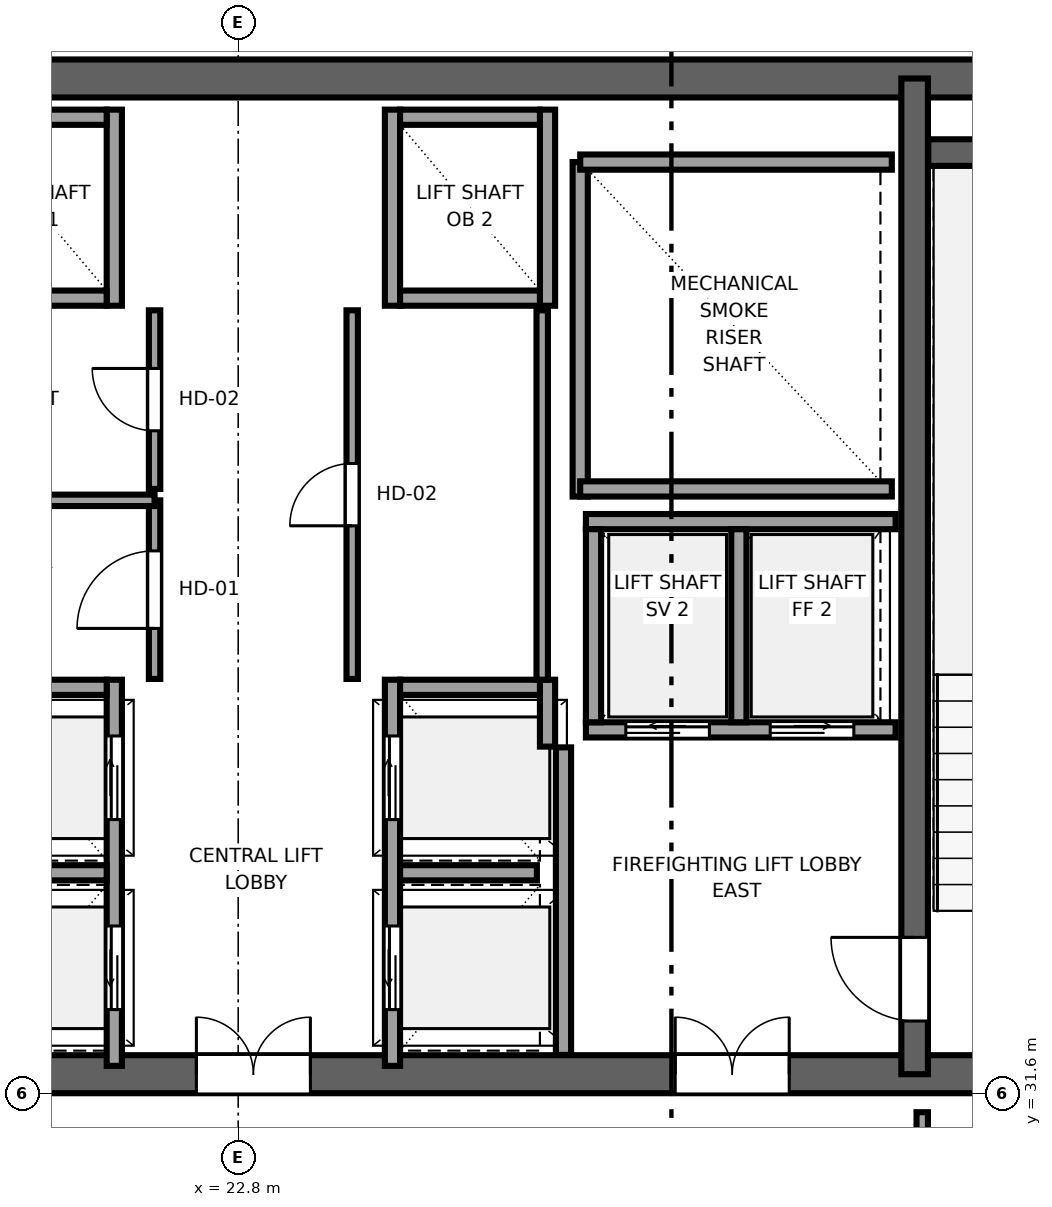
"""IFC4 building model, lengths in metres.
Left out: names, types, materials, properties, quantities, classifications, styles, units other than length and angle.
Written with IfcOpenShell. Run it as: python <this file> out.ifc"""

import sys

from ifc_helpers import new_model, si_unit, direction, frame, frame_2d, origin, place, context, subcontext, project, spatial, rectangle, extrude, source, transform, mapped, element, fill, save


model = new_model("IFC4")
c1 = context("Model", 3, precision=1e-05, world=origin(), true_north=direction((0.0, 1.0)))
c2 = subcontext(c1, "Body", "Model", "MODEL_VIEW")
j1 = project(units=[si_unit("LENGTHUNIT", "METRE"), si_unit("PLANEANGLEUNIT", "RADIAN")], contexts=[c1])
p1 = place(None, origin())
s1 = spatial("IfcSite", under=j1, at=p1, CompositionType="ELEMENT")
p2 = place(p1, origin())
s2 = spatial("IfcBuilding", under=s1, at=p2, CompositionType="ELEMENT")
p3 = place(p2, frame((0.0, 0.0, 278.6)))
s3 = spatial("IfcBuildingStorey", under=s2, at=p3, CompositionType="ELEMENT", Elevation=278.6)
p4 = place(p3, frame((10.0, 31.85, 0.0), z_axis=(0.0, 0.0, 1.0), x_axis=(1.0, 0.0, 0.0)))
e1 = element("IfcWall", 1, at=p4, inside=s3, PredefinedType="SHEAR", context=c2, shape_type="SweptSolid", body=[
    extrude(rectangle(XDim=26.0, YDim=0.5, at=frame_2d((13.0, 0.0))), origin(), (0.0, 0.0, 1.0), 3.55),
])
p5 = place(p4, frame((7.45, 0.0, 0.0), z_axis=(0.0, 0.0, 1.0), x_axis=(-1.0, 0.0, 0.0)))
e2 = element("IfcOpeningElement", 2, at=p5, cuts=e1, PredefinedType="OPENING", context=c2, shape_type="SweptSolid", body=[
    extrude(rectangle(XDim=1.5, YDim=2.04, at=frame_2d((0.75, 1.02))), frame((0.0, 0.26, 0.0), z_axis=(0.0, -1.0, 0.0), x_axis=(1.0, 0.0, 0.0)), (0.0, 0.0, 1.0), 0.52),
])
p6 = place(p4, frame((13.75, 0.0, 0.0), z_axis=(0.0, 0.0, 1.0), x_axis=(-1.0, 0.0, 0.0)))
e3 = element("IfcOpeningElement", 3, at=p6, cuts=e1, PredefinedType="OPENING", context=c2, shape_type="SweptSolid", body=[
    extrude(rectangle(XDim=1.5, YDim=2.04, at=frame_2d((0.75, 1.02))), frame((0.0, 0.26, 0.0), z_axis=(0.0, -1.0, 0.0), x_axis=(1.0, 0.0, 0.0)), (0.0, 0.0, 1.0), 0.52),
])
p7 = place(p4, frame((20.05, 0.0, 0.0), z_axis=(0.0, 0.0, 1.0), x_axis=(-1.0, 0.0, 0.0)))
e4 = element("IfcOpeningElement", 4, at=p7, cuts=e1, PredefinedType="OPENING", context=c2, shape_type="SweptSolid", body=[
    extrude(rectangle(XDim=1.5, YDim=2.04, at=frame_2d((0.75, 1.02))), frame((0.0, 0.26, 0.0), z_axis=(0.0, -1.0, 0.0), x_axis=(1.0, 0.0, 0.0)), (0.0, 0.0, 1.0), 0.52),
])
p8 = place(p3, frame((10.0, 44.95, 0.0), z_axis=(0.0, 0.0, 1.0), x_axis=(1.0, 0.0, 0.0)))
e5 = element("IfcWall", 5, at=p8, inside=s3, PredefinedType="SHEAR", context=c2, shape_type="SweptSolid", body=[
    extrude(rectangle(XDim=26.0, YDim=0.5, at=frame_2d((13.0, 0.0))), origin(), (0.0, 0.0, 1.0), 3.55),
])
p9 = place(p3, frame((31.7, 31.85, 0.0), z_axis=(0.0, 0.0, 1.0), x_axis=(0.0, 1.0, 0.0)))
e6 = element("IfcWall", 6, at=p9, inside=s3, PredefinedType="SHEAR", context=c2, shape_type="SweptSolid", body=[
    extrude(rectangle(XDim=13.1, YDim=0.35, at=frame_2d((6.55, 0.0))), origin(), (0.0, 0.0, 1.0), 3.55),
])
p10 = place(p9, frame((1.8, 0.0, 0.0), z_axis=(0.0, 0.0, 1.0), x_axis=(-1.0, 0.0, 0.0)))
e7 = element("IfcOpeningElement", 7, at=p10, cuts=e6, PredefinedType="OPENING", context=c2, shape_type="SweptSolid", body=[
    extrude(rectangle(XDim=1.1, YDim=2.12, at=frame_2d((0.55, 1.06))), frame((0.0, 0.185, 0.0), z_axis=(0.0, -1.0, 0.0), x_axis=(1.0, 0.0, 0.0)), (0.0, 0.0, 1.0), 0.37),
])
p11 = place(p3, frame((31.88, 43.975, 0.0), z_axis=(0.0, 0.0, 1.0), x_axis=(1.0, 0.0, 0.0)))
e8 = element("IfcWall", 8, at=p11, inside=s3, PredefinedType="SHEAR", context=c2, shape_type="SweptSolid", body=[
    extrude(rectangle(XDim=3.6, YDim=0.35, at=frame_2d((1.8, 0.0))), origin(), (0.0, 0.0, 1.0), 3.55),
])
p12 = place(p3, frame((27.3, 39.45, 0.0), z_axis=(0.0, 0.0, 1.0), x_axis=(0.0, 1.0, 0.0)))
e9 = element("IfcWall", 9, at=p12, inside=s3, PredefinedType="SOLIDWALL", context=c2, shape_type="SweptSolid", body=[
    extrude(rectangle(XDim=4.4, YDim=0.2, at=frame_2d((2.2, 0.0))), origin(), (0.0, 0.0, 1.0), 3.33),
])
for number, where, z_axis, x_axis in (
    (10, (27.3, 39.55, 0.0), (0.0, 0.0, 1.0), (1.0, 0.0, 0.0)),
    (11, (27.3, 43.85, 0.0), (0.0, 0.0, 1.0), (1.0, 0.0, 0.0)),
):
    element("IfcWall", number, at=place(p3, frame(where, z_axis=z_axis, x_axis=x_axis)), inside=s3, PredefinedType="SOLIDWALL", context=c2, shape_type="SweptSolid", body=[
        extrude(rectangle(XDim=4.1, YDim=0.2, at=frame_2d((2.05, 0.0))), origin(), (0.0, 0.0, 1.0), 3.33),
    ])
p13 = place(p3, frame((27.08, 32.104, 0.0), z_axis=(0.0, 0.0, 1.0), x_axis=(0.0, 1.0, 0.0)))
e12 = element("IfcWall", 12, at=p13, inside=s3, PredefinedType="SOLIDWALL", context=c2, shape_type="SweptSolid", body=[
    extrude(rectangle(XDim=4.046, YDim=0.2, at=frame_2d((2.023, 0.0))), origin(), (0.0, 0.0, 1.0), 3.33),
])
p14 = place(p3, frame((21.17, 31.96, 0.0), z_axis=(0.0, 0.0, 1.0), x_axis=(0.0, 1.0, 0.0)))
e13 = element("IfcWall", 13, at=p14, inside=s3, PredefinedType="SOLIDWALL", context=c2, shape_type="SweptSolid", body=[
    extrude(rectangle(XDim=5.08, YDim=0.2, at=frame_2d((2.54, 0.0))), origin(), (0.0, 0.0, 1.0), 3.33),
])
p15 = place(p14, frame((0.74, 0.0, 0.0)))
e14 = element("IfcOpeningElement", 14, at=p15, cuts=e13, PredefinedType="OPENING", context=c2, shape_type="SweptSolid", body=[
    extrude(rectangle(XDim=1.1, YDim=2.12, at=frame_2d((0.55, 1.06))), frame((0.0, 0.11, 0.0), z_axis=(0.0, -1.0, 0.0), x_axis=(1.0, 0.0, 0.0)), (0.0, 0.0, 1.0), 0.22),
])
p16 = place(p14, frame((3.24, 0.0, 0.0)))
e15 = element("IfcOpeningElement", 15, at=p16, cuts=e13, PredefinedType="OPENING", context=c2, shape_type="SweptSolid", body=[
    extrude(rectangle(XDim=1.1, YDim=2.12, at=frame_2d((0.55, 1.06))), frame((0.0, 0.11, 0.0), z_axis=(0.0, -1.0, 0.0), x_axis=(1.0, 0.0, 0.0)), (0.0, 0.0, 1.0), 0.22),
])
p17 = place(p3, frame((19.23, 36.94, 0.0), z_axis=(0.0, 0.0, 1.0), x_axis=(1.0, 0.0, 0.0)))
e16 = element("IfcWall", 16, at=p17, inside=s3, PredefinedType="SOLIDWALL", context=c2, shape_type="SweptSolid", body=[
    extrude(rectangle(XDim=1.84, YDim=0.2, at=frame_2d((0.92, 0.0))), origin(), (0.0, 0.0, 1.0), 3.33),
])
p18 = place(p3, frame((19.27, 34.5, 0.0), z_axis=(0.0, 0.0, 1.0), x_axis=(1.0, 0.0, 0.0)))
e17 = element("IfcWall", 17, at=p18, inside=s3, PredefinedType="SOLIDWALL", context=c2, shape_type="SweptSolid", body=[
    extrude(rectangle(XDim=1.8, YDim=0.2, at=frame_2d((0.9, 0.0))), origin(), (0.0, 0.0, 1.0), 3.33),
])
p19 = place(p3, frame((21.17, 41.96, 0.0), z_axis=(0.0, 0.0, 1.0), x_axis=(0.0, 1.0, 0.0)))
e18 = element("IfcWall", 18, at=p19, inside=s3, PredefinedType="SOLIDWALL", context=c2, shape_type="SweptSolid", body=[
    extrude(rectangle(XDim=2.58, YDim=0.2, at=frame_2d((1.29, 0.0))), origin(), (0.0, 0.0, 1.0), 3.33),
])
for number, where, z_axis, x_axis in (
    (19, (19.23, 42.06, 0.0), (0.0, 0.0, 1.0), (1.0, 0.0, 0.0)),
    (20, (19.23, 44.44, 0.0), (0.0, 0.0, 1.0), (1.0, 0.0, 0.0)),
):
    element("IfcWall", number, at=place(p3, frame(where, z_axis=z_axis, x_axis=x_axis)), inside=s3, PredefinedType="SOLIDWALL", context=c2, shape_type="SweptSolid", body=[
        extrude(rectangle(XDim=1.84, YDim=0.2, at=frame_2d((0.92, 0.0))), origin(), (0.0, 0.0, 1.0), 3.33),
    ])
p20 = place(p3, frame((27.375, 36.38, 0.0), z_axis=(0.0, 0.0, 1.0), x_axis=(1.0, 0.0, 0.0)))
e21 = element("IfcWall", 21, at=p20, inside=s3, PredefinedType="SOLIDWALL", context=c2, shape_type="SweptSolid", body=[
    extrude(rectangle(XDim=4.075, YDim=0.2, at=frame_2d((2.038, 0.0))), origin(), (0.0, 0.0, 1.0), 3.33),
])
p21 = place(p20, frame((0.525, 0.0, 0.0)))
e22 = element("IfcOpeningElement", 22, at=p21, cuts=e21, PredefinedType="OPENING", context=c2, shape_type="SweptSolid", body=[
    extrude(rectangle(XDim=1.1, YDim=2.12, at=frame_2d((0.55, 1.06))), frame((0.0, 0.11, 0.0), z_axis=(0.0, -1.0, 0.0), x_axis=(1.0, 0.0, 0.0)), (0.0, 0.0, 1.0), 0.22),
])
p22 = place(p20, frame((2.425, 0.0, 0.0)))
e23 = element("IfcOpeningElement", 23, at=p22, cuts=e21, PredefinedType="OPENING", context=c2, shape_type="SweptSolid", body=[
    extrude(rectangle(XDim=1.1, YDim=2.12, at=frame_2d((0.55, 1.06))), frame((0.0, 0.11, 0.0), z_axis=(0.0, -1.0, 0.0), x_axis=(1.0, 0.0, 0.0)), (0.0, 0.0, 1.0), 0.22),
])
p23 = place(p3, frame((27.375, 39.12, 0.0), z_axis=(0.0, 0.0, 1.0), x_axis=(1.0, 0.0, 0.0)))
e24 = element("IfcWall", 24, at=p23, inside=s3, PredefinedType="SOLIDWALL", context=c2, shape_type="SweptSolid", body=[
    extrude(rectangle(XDim=4.075, YDim=0.2, at=frame_2d((2.038, 0.0))), origin(), (0.0, 0.0, 1.0), 3.33),
])
for number, where, z_axis, x_axis in (
    (25, (27.475, 36.48, 0.0), (0.0, 0.0, 1.0), (0.0, 1.0, 0.0)),
    (26, (29.387, 36.48, 0.0), (0.0, 0.0, 1.0), (0.0, 1.0, 0.0)),
):
    element("IfcWall", number, at=place(p3, frame(where, z_axis=z_axis, x_axis=x_axis)), inside=s3, PredefinedType="SOLIDWALL", context=c2, shape_type="SweptSolid", body=[
        extrude(rectangle(XDim=2.54, YDim=0.2, at=frame_2d((1.27, 0.0))), origin(), (0.0, 0.0, 1.0), 3.33),
    ])
p24 = place(p3, frame((24.83, 31.96, 0.0), z_axis=(0.0, 0.0, 1.0), x_axis=(0.0, 1.0, 0.0)))
e27 = element("IfcWall", 27, at=p24, inside=s3, PredefinedType="SOLIDWALL", context=c2, shape_type="SweptSolid", body=[
    extrude(rectangle(XDim=5.08, YDim=0.2, at=frame_2d((2.54, 0.0))), origin(), (0.0, 0.0, 1.0), 3.33),
])
p25 = place(p24, frame((0.74, 0.0, 0.0)))
e28 = element("IfcOpeningElement", 28, at=p25, cuts=e27, PredefinedType="OPENING", context=c2, shape_type="SweptSolid", body=[
    extrude(rectangle(XDim=1.1, YDim=2.12, at=frame_2d((0.55, 1.06))), frame((0.0, 0.11, 0.0), z_axis=(0.0, -1.0, 0.0), x_axis=(1.0, 0.0, 0.0)), (0.0, 0.0, 1.0), 0.22),
])
p26 = place(p24, frame((3.24, 0.0, 0.0)))
e29 = element("IfcOpeningElement", 29, at=p26, cuts=e27, PredefinedType="OPENING", context=c2, shape_type="SweptSolid", body=[
    extrude(rectangle(XDim=1.1, YDim=2.12, at=frame_2d((0.55, 1.06))), frame((0.0, 0.11, 0.0), z_axis=(0.0, -1.0, 0.0), x_axis=(1.0, 0.0, 0.0)), (0.0, 0.0, 1.0), 0.22),
])
p27 = place(p3, frame((26.87, 36.16, 0.0), z_axis=(0.0, 0.0, 1.0), x_axis=(0.0, 1.0, 0.0)))
e30 = element("IfcWall", 30, at=p27, inside=s3, PredefinedType="SOLIDWALL", context=c2, shape_type="SweptSolid", body=[
    extrude(rectangle(XDim=0.88, YDim=0.2, at=frame_2d((0.44, 0.0))), origin(), (0.0, 0.0, 1.0), 3.33),
])
p28 = place(p3, frame((24.93, 36.94, 0.0), z_axis=(0.0, 0.0, 1.0), x_axis=(1.0, 0.0, 0.0)))
e31 = element("IfcWall", 31, at=p28, inside=s3, PredefinedType="SOLIDWALL", context=c2, shape_type="SweptSolid", body=[
    extrude(rectangle(XDim=1.84, YDim=0.2, at=frame_2d((0.92, 0.0))), origin(), (0.0, 0.0, 1.0), 3.33),
])
p29 = place(p3, frame((24.93, 34.5, 0.0), z_axis=(0.0, 0.0, 1.0), x_axis=(1.0, 0.0, 0.0)))
e32 = element("IfcWall", 32, at=p29, inside=s3, PredefinedType="SOLIDWALL", context=c2, shape_type="SweptSolid", body=[
    extrude(rectangle(XDim=1.8, YDim=0.2, at=frame_2d((0.9, 0.0))), origin(), (0.0, 0.0, 1.0), 3.33),
])
for number, where, z_axis, x_axis in (
    (33, (24.83, 41.96, 0.0), (0.0, 0.0, 1.0), (0.0, 1.0, 0.0)),
    (34, (26.87, 41.96, 0.0), (0.0, 0.0, 1.0), (0.0, 1.0, 0.0)),
):
    element("IfcWall", number, at=place(p3, frame(where, z_axis=z_axis, x_axis=x_axis)), inside=s3, PredefinedType="SOLIDWALL", context=c2, shape_type="SweptSolid", body=[
        extrude(rectangle(XDim=2.58, YDim=0.2, at=frame_2d((1.29, 0.0))), origin(), (0.0, 0.0, 1.0), 3.33),
    ])
for number, where, z_axis, x_axis in (
    (35, (24.93, 42.06, 0.0), (0.0, 0.0, 1.0), (1.0, 0.0, 0.0)),
    (36, (24.93, 44.44, 0.0), (0.0, 0.0, 1.0), (1.0, 0.0, 0.0)),
):
    element("IfcWall", number, at=place(p3, frame(where, z_axis=z_axis, x_axis=x_axis)), inside=s3, PredefinedType="SOLIDWALL", context=c2, shape_type="SweptSolid", body=[
        extrude(rectangle(XDim=1.84, YDim=0.2, at=frame_2d((0.92, 0.0))), origin(), (0.0, 0.0, 1.0), 3.33),
    ])
p30 = place(p3, frame((21.7, 37.05, 0.0), z_axis=(0.0, 0.0, 1.0), x_axis=(0.0, 1.0, 0.0)))
e37 = element("IfcWall", 37, at=p30, inside=s3, PredefinedType="PARTITIONING", context=c2, shape_type="SweptSolid", body=[
    extrude(rectangle(XDim=2.35, YDim=0.15, at=frame_2d((1.175, 0.0))), origin(), (0.0, 0.0, 1.0), 3.33),
])
p31 = place(p30, frame((0.665, 0.0, 0.0)))
e38 = element("IfcOpeningElement", 38, at=p31, cuts=e37, PredefinedType="OPENING", context=c2, shape_type="SweptSolid", body=[
    extrude(rectangle(XDim=1.02, YDim=2.03, at=frame_2d((0.51, 1.015))), frame((0.0, 0.085, 0.0), z_axis=(0.0, -1.0, 0.0), x_axis=(1.0, 0.0, 0.0)), (0.0, 0.0, 1.0), 0.17),
])
p32 = place(p3, frame((19.2, 39.4, 0.0), z_axis=(0.0, 0.0, 1.0), x_axis=(1.0, 0.0, 0.0)))
e39 = element("IfcWall", 39, at=p32, inside=s3, PredefinedType="PARTITIONING", context=c2, shape_type="SweptSolid", body=[
    extrude(rectangle(XDim=2.5, YDim=0.15, at=frame_2d((1.25, 0.0))), origin(), (0.0, 0.0, 1.0), 3.33),
])
p33 = place(p3, frame((21.7, 39.55, 0.0), z_axis=(0.0, 0.0, 1.0), x_axis=(0.0, 1.0, 0.0)))
e40 = element("IfcWall", 40, at=p33, inside=s3, PredefinedType="PARTITIONING", context=c2, shape_type="SweptSolid", body=[
    extrude(rectangle(XDim=2.35, YDim=0.15, at=frame_2d((1.175, 0.0))), origin(), (0.0, 0.0, 1.0), 3.33),
])
p34 = place(p33, frame((0.765, 0.0, 0.0)))
e41 = element("IfcOpeningElement", 41, at=p34, cuts=e40, PredefinedType="OPENING", context=c2, shape_type="SweptSolid", body=[
    extrude(rectangle(XDim=0.82, YDim=2.01, at=frame_2d((0.41, 1.005))), frame((0.0, 0.085, 0.0), z_axis=(0.0, -1.0, 0.0), x_axis=(1.0, 0.0, 0.0)), (0.0, 0.0, 1.0), 0.17),
])
p35 = place(p3, frame((24.3, 37.05, 0.0), z_axis=(0.0, 0.0, 1.0), x_axis=(0.0, 1.0, 0.0)))
e42 = element("IfcWall", 42, at=p35, inside=s3, PredefinedType="PARTITIONING", context=c2, shape_type="SweptSolid", body=[
    extrude(rectangle(XDim=4.85, YDim=0.15, at=frame_2d((2.425, 0.0))), origin(), (0.0, 0.0, 1.0), 3.33),
])
p36 = place(p35, frame((2.015, 0.0, 0.0)))
e43 = element("IfcOpeningElement", 43, at=p36, cuts=e42, PredefinedType="OPENING", context=c2, shape_type="SweptSolid", body=[
    extrude(rectangle(XDim=0.82, YDim=2.01, at=frame_2d((0.41, 1.005))), frame((0.0, 0.085, 0.0), z_axis=(0.0, -1.0, 0.0), x_axis=(1.0, 0.0, 0.0)), (0.0, 0.0, 1.0), 0.17),
])
p37 = place(p3, frame((26.8, 37.04, 0.0), z_axis=(0.0, 0.0, 1.0), x_axis=(0.0, 1.0, 0.0)))
e44 = element("IfcWall", 44, at=p37, inside=s3, PredefinedType="PARTITIONING", context=c2, shape_type="SweptSolid", body=[
    extrude(rectangle(XDim=4.86, YDim=0.15, at=frame_2d((2.43, 0.0))), origin(), (0.0, 0.0, 1.0), 3.33),
])
p38 = place(p3, frame((31.8, 24.8, 0.0), z_axis=(0.0, 0.0, 1.0), x_axis=(0.0, 1.0, 0.0)))
e45 = element("IfcWall", 45, at=p38, inside=s3, PredefinedType="PARTITIONING", context=c2, shape_type="SweptSolid", body=[
    extrude(rectangle(XDim=6.55, YDim=0.15, at=frame_2d((3.275, 0.0))), origin(), (0.0, 0.0, 1.0), 3.33),
])
p39 = place(p38, frame((2.765, 0.0, 0.0)))
e46 = element("IfcOpeningElement", 46, at=p39, cuts=e45, PredefinedType="OPENING", context=c2, shape_type="SweptSolid", body=[
    extrude(rectangle(XDim=1.02, YDim=2.03, at=frame_2d((0.51, 1.015))), frame((0.0, 0.085, 0.0), z_axis=(0.0, -1.0, 0.0), x_axis=(1.0, 0.0, 0.0)), (0.0, 0.0, 1.0), 0.17),
])
m1 = source(origin(), c2, "Body", "SweptSolid", [
    extrude(rectangle(XDim=1.1, YDim=2.12, at=frame_2d((0.55, 1.06))), frame((0.0, 0.025, 0.0), z_axis=(0.0, -1.0, 0.0), x_axis=(1.0, 0.0, 0.0)), (0.0, 0.0, 1.0), 0.05),
])
p40 = place(p10, origin())
e47 = element("IfcDoor", 47, at=p40, inside=s3, OperationType="SINGLE_SWING_RIGHT", PredefinedType="DOOR", context=c2, shape_type="MappedRepresentation", body=[
    mapped(m1, transform((0.0, 0.0, 0.0), x_axis=(1.0, 0.0, 0.0), y_axis=(0.0, 1.0, 0.0), z_axis=(0.0, 0.0, 1.0), scale=1.0)),
])
fill(e7, e47)
m2 = source(origin(), c2, "Body", "SweptSolid", [
    extrude(rectangle(XDim=1.5, YDim=2.04, at=frame_2d((0.75, 1.02))), frame((0.0, 0.025, 0.0), z_axis=(0.0, -1.0, 0.0), x_axis=(1.0, 0.0, 0.0)), (0.0, 0.0, 1.0), 0.05),
])
p41 = place(p6, origin())
e48 = element("IfcDoor", 48, at=p41, inside=s3, OperationType="DOUBLE_DOOR_SINGLE_SWING", PredefinedType="DOOR", context=c2, shape_type="MappedRepresentation", body=[
    mapped(m2, transform((0.0, 0.0, 0.0), x_axis=(1.0, 0.0, 0.0), y_axis=(0.0, 1.0, 0.0), z_axis=(0.0, 0.0, 1.0), scale=1.0)),
])
fill(e3, e48)
p42 = place(p7, origin())
e49 = element("IfcDoor", 49, at=p42, inside=s3, OperationType="DOUBLE_DOOR_SINGLE_SWING", PredefinedType="DOOR", context=c2, shape_type="MappedRepresentation", body=[
    mapped(m2, transform((0.0, 0.0, 0.0), x_axis=(1.0, 0.0, 0.0), y_axis=(0.0, 1.0, 0.0), z_axis=(0.0, 0.0, 1.0), scale=1.0)),
])
fill(e4, e49)
m3 = source(origin(), c2, "Body", "SweptSolid", [
    extrude(rectangle(XDim=1.1, YDim=2.12, at=frame_2d((0.55, 1.06))), frame((0.0, 0.025, 0.0), z_axis=(0.0, -1.0, 0.0), x_axis=(1.0, 0.0, 0.0)), (0.0, 0.0, 1.0), 0.05),
])
p43 = place(p15, origin())
e50 = element("IfcDoor", 50, at=p43, inside=s3, OperationType="SLIDING_TO_LEFT", PredefinedType="DOOR", context=c2, shape_type="MappedRepresentation", body=[
    mapped(m3, transform((0.0, 0.0, 0.0), x_axis=(1.0, 0.0, 0.0), y_axis=(0.0, 1.0, 0.0), z_axis=(0.0, 0.0, 1.0), scale=1.0)),
])
fill(e14, e50)
p44 = place(p16, origin())
e51 = element("IfcDoor", 51, at=p44, inside=s3, OperationType="SLIDING_TO_RIGHT", PredefinedType="DOOR", context=c2, shape_type="MappedRepresentation", body=[
    mapped(m3, transform((0.0, 0.0, 0.0), x_axis=(1.0, 0.0, 0.0), y_axis=(0.0, 1.0, 0.0), z_axis=(0.0, 0.0, 1.0), scale=1.0)),
])
fill(e15, e51)
p45 = place(p21, origin())
e52 = element("IfcDoor", 52, at=p45, inside=s3, OperationType="SLIDING_TO_LEFT", PredefinedType="DOOR", context=c2, shape_type="MappedRepresentation", body=[
    mapped(m3, transform((0.0, 0.0, 0.0), x_axis=(1.0, 0.0, 0.0), y_axis=(0.0, 1.0, 0.0), z_axis=(0.0, 0.0, 1.0), scale=1.0)),
])
fill(e22, e52)
p46 = place(p22, origin())
e53 = element("IfcDoor", 53, at=p46, inside=s3, OperationType="SLIDING_TO_RIGHT", PredefinedType="DOOR", context=c2, shape_type="MappedRepresentation", body=[
    mapped(m3, transform((0.0, 0.0, 0.0), x_axis=(1.0, 0.0, 0.0), y_axis=(0.0, 1.0, 0.0), z_axis=(0.0, 0.0, 1.0), scale=1.0)),
])
fill(e23, e53)
p47 = place(p25, origin())
e54 = element("IfcDoor", 54, at=p47, inside=s3, OperationType="SLIDING_TO_LEFT", PredefinedType="DOOR", context=c2, shape_type="MappedRepresentation", body=[
    mapped(m3, transform((0.0, 0.0, 0.0), x_axis=(1.0, 0.0, 0.0), y_axis=(0.0, 1.0, 0.0), z_axis=(0.0, 0.0, 1.0), scale=1.0)),
])
fill(e28, e54)
p48 = place(p26, origin())
e55 = element("IfcDoor", 55, at=p48, inside=s3, OperationType="SLIDING_TO_RIGHT", PredefinedType="DOOR", context=c2, shape_type="MappedRepresentation", body=[
    mapped(m3, transform((0.0, 0.0, 0.0), x_axis=(1.0, 0.0, 0.0), y_axis=(0.0, 1.0, 0.0), z_axis=(0.0, 0.0, 1.0), scale=1.0)),
])
fill(e29, e55)
m4 = source(origin(), c2, "Body", "SweptSolid", [
    extrude(rectangle(XDim=1.02, YDim=2.03, at=frame_2d((0.51, 1.015))), frame((0.0, 0.025, 0.0), z_axis=(0.0, -1.0, 0.0), x_axis=(1.0, 0.0, 0.0)), (0.0, 0.0, 1.0), 0.05),
])
p49 = place(p31, origin())
e56 = element("IfcDoor", 56, at=p49, inside=s3, OperationType="SINGLE_SWING_LEFT", PredefinedType="DOOR", context=c2, shape_type="MappedRepresentation", body=[
    mapped(m4, transform((0.0, 0.0, 0.0), x_axis=(1.0, 0.0, 0.0), y_axis=(0.0, 1.0, 0.0), z_axis=(0.0, 0.0, 1.0), scale=1.0)),
])
fill(e38, e56)
m5 = source(origin(), c2, "Body", "SweptSolid", [
    extrude(rectangle(XDim=0.82, YDim=2.01, at=frame_2d((0.41, 1.005))), frame((0.0, 0.025, 0.0), z_axis=(0.0, -1.0, 0.0), x_axis=(1.0, 0.0, 0.0)), (0.0, 0.0, 1.0), 0.05),
])
p50 = place(p34, origin())
e57 = element("IfcDoor", 57, at=p50, inside=s3, OperationType="SINGLE_SWING_RIGHT", PredefinedType="DOOR", context=c2, shape_type="MappedRepresentation", body=[
    mapped(m5, transform((0.0, 0.0, 0.0), x_axis=(1.0, 0.0, 0.0), y_axis=(0.0, 1.0, 0.0), z_axis=(0.0, 0.0, 1.0), scale=1.0)),
])
fill(e41, e57)
p51 = place(p36, origin())
e58 = element("IfcDoor", 58, at=p51, inside=s3, OperationType="SINGLE_SWING_LEFT", PredefinedType="DOOR", context=c2, shape_type="MappedRepresentation", body=[
    mapped(m5, transform((0.0, 0.0, 0.0), x_axis=(1.0, 0.0, 0.0), y_axis=(0.0, 1.0, 0.0), z_axis=(0.0, 0.0, 1.0), scale=1.0)),
])
fill(e43, e58)
save(model, sys.argv[1])
